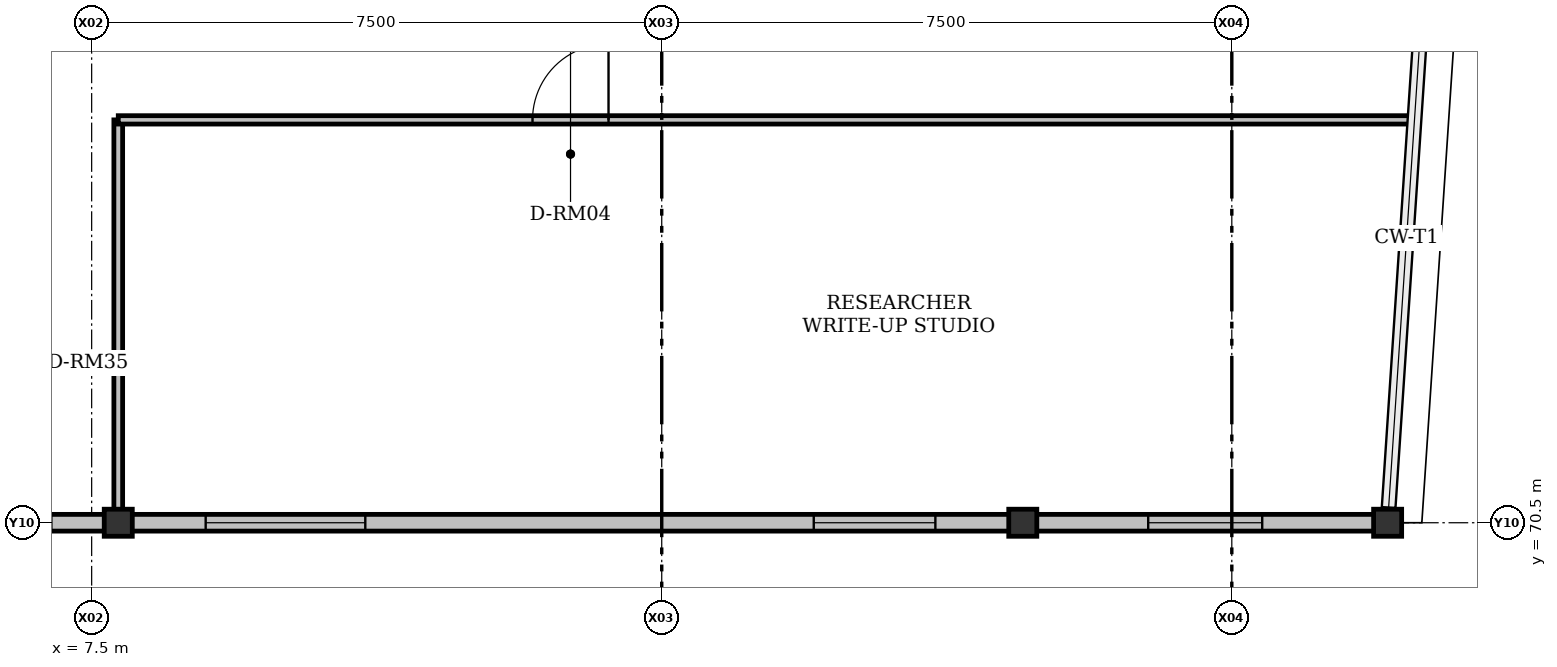
"""IFC4 building model, lengths in metres.
Left out: names, types, materials, properties, quantities, classifications, styles, units other than length and angle.
Written with IfcOpenShell. Run it as: python <this file> out.ifc"""

import sys

from ifc_helpers import new_model, si_unit, direction, frame, frame_2d, origin, origin_2d, place, context, subcontext, project, spatial, rectangle, i_section, extrude, element, fill, save


model = new_model("IFC4")
c1 = context("Model", 3, precision=1e-05, world=origin(), true_north=direction((0.0, 1.0)))
c2 = subcontext(c1, "Body", "Model", "MODEL_VIEW")
j1 = project(units=[si_unit("LENGTHUNIT", "METRE"), si_unit("PLANEANGLEUNIT", "RADIAN")], contexts=[c1])
p1 = place(None, origin())
s1 = spatial("IfcSite", under=j1, at=p1, CompositionType="ELEMENT")
p2 = place(p1, origin())
s2 = spatial("IfcBuilding", under=s1, at=p2, CompositionType="ELEMENT")
p3 = place(p2, frame((0.0, 0.0, 56.1)))
s3 = spatial("IfcBuildingStorey", under=s2, at=p3, CompositionType="ELEMENT", Elevation=56.1)
for number, where, z_axis, x_axis in (
    (1, (7.85, 70.5, 0.0), (0.0, 0.0, 1.0), (1.0, 0.0, 0.0)),
    (2, (19.75, 70.5, 0.0), (0.0, 0.0, 1.0), (1.0, 0.0, 0.0)),
    (3, (24.55, 70.5, 0.0), (0.0, 0.0, 1.0), (1.0, 0.0, 0.0)),
):
    element("IfcColumn", number, at=place(p3, frame(where, z_axis=z_axis, x_axis=x_axis)), inside=s3, PredefinedType="COLUMN", context=c2, shape_type="SweptSolid", body=[
        extrude(i_section(OverallWidth=0.369, OverallDepth=0.356, WebThickness=0.011, FlangeThickness=0.018, FilletRadius=0.015, at=origin_2d()), origin(), (0.0, 0.0, 1.0), 4.2),
    ])
p4 = place(p3, frame((7.85, 70.5, 0.0), z_axis=(0.0, 0.0, 1.0), x_axis=(-1.0, 0.0, 0.0)))
e4 = element("IfcWall", 4, at=p4, inside=s3, PredefinedType="SOLIDWALL", context=c2, shape_type="SweptSolid", body=[
    extrude(rectangle(XDim=7.3, YDim=0.22, at=frame_2d((3.65, 0.0))), origin(), (0.0, 0.0, 1.0), 3.562),
])
p5 = place(p4, frame((0.88, 0.0, 0.92)))
e5 = element("IfcOpeningElement", 5, at=p5, cuts=e4, PredefinedType="OPENING", context=c2, shape_type="SweptSolid", body=[
    extrude(rectangle(XDim=1.05, YDim=1.3, at=frame_2d((0.525, 0.65))), frame((0.0, 0.11, 0.0), z_axis=(0.0, -1.0, 0.0), x_axis=(1.0, 0.0, 0.0)), (0.0, 0.0, 1.0), 0.22),
])
p6 = place(p4, frame((3.945, 0.0, 0.92)))
e6 = element("IfcOpeningElement", 6, at=p6, cuts=e4, PredefinedType="OPENING", context=c2, shape_type="SweptSolid", body=[
    extrude(rectangle(XDim=1.2, YDim=1.4, at=frame_2d((0.6, 0.7))), frame((0.0, 0.11, 0.0), z_axis=(0.0, -1.0, 0.0), x_axis=(1.0, 0.0, 0.0)), (0.0, 0.0, 1.0), 0.22),
])
p7 = place(p3, frame((19.75, 70.5, 0.0), z_axis=(0.0, 0.0, 1.0), x_axis=(-1.0, 0.0, 0.0)))
e7 = element("IfcWall", 7, at=p7, inside=s3, PredefinedType="SOLIDWALL", context=c2, shape_type="SweptSolid", body=[
    extrude(rectangle(XDim=11.9, YDim=0.22, at=frame_2d((5.95, 0.0))), origin(), (0.0, 0.0, 1.0), 3.562),
])
p8 = place(p7, frame((1.15, 0.0, 0.92)))
e8 = element("IfcOpeningElement", 8, at=p8, cuts=e7, PredefinedType="OPENING", context=c2, shape_type="SweptSolid", body=[
    extrude(rectangle(XDim=1.6, YDim=1.35, at=frame_2d((0.8, 0.675))), frame((0.0, 0.11, 0.0), z_axis=(0.0, -1.0, 0.0), x_axis=(1.0, 0.0, 0.0)), (0.0, 0.0, 1.0), 0.22),
])
p9 = place(p7, frame((8.65, 0.0, 0.92)))
e9 = element("IfcOpeningElement", 9, at=p9, cuts=e7, PredefinedType="OPENING", context=c2, shape_type="SweptSolid", body=[
    extrude(rectangle(XDim=2.1, YDim=1.4, at=frame_2d((1.05, 0.7))), frame((0.0, 0.11, 0.0), z_axis=(0.0, -1.0, 0.0), x_axis=(1.0, 0.0, 0.0)), (0.0, 0.0, 1.0), 0.22),
])
p10 = place(p3, frame((24.55, 70.5, 0.0), z_axis=(0.0, 0.0, 1.0), x_axis=(-1.0, 0.0, 0.0)))
e10 = element("IfcWall", 10, at=p10, inside=s3, PredefinedType="SOLIDWALL", context=c2, shape_type="SweptSolid", body=[
    extrude(rectangle(XDim=4.8, YDim=0.22, at=frame_2d((2.4, 0.0))), origin(), (0.0, 0.0, 1.0), 2.775),
])
p11 = place(p10, frame((1.65, 0.0, 0.92)))
e11 = element("IfcOpeningElement", 11, at=p11, cuts=e10, PredefinedType="OPENING", context=c2, shape_type="SweptSolid", body=[
    extrude(rectangle(XDim=1.5, YDim=1.4, at=frame_2d((0.75, 0.7))), frame((0.0, 0.11, 0.0), z_axis=(0.0, -1.0, 0.0), x_axis=(1.0, 0.0, 0.0)), (0.0, 0.0, 1.0), 0.22),
])
p12 = place(p3, frame((7.85, 70.673, 0.0), z_axis=(0.0, 0.0, 1.0), x_axis=(0.0, 1.0, 0.0)))
e12 = element("IfcWall", 12, at=p12, inside=s3, PredefinedType="PARTITIONING", context=c2, shape_type="SweptSolid", body=[
    extrude(rectangle(XDim=5.127, YDim=0.115, at=frame_2d((2.563, 0.0))), origin(), (0.0, 0.0, 1.0), 3.512),
])
p13 = place(p3, frame((7.85, 75.8, 0.0), z_axis=(0.0, 0.0, 1.0), x_axis=(1.0, 0.0, 0.0)))
e13 = element("IfcWall", 13, at=p13, inside=s3, PredefinedType="PARTITIONING", context=c2, shape_type="SweptSolid", body=[
    extrude(rectangle(XDim=17.065, YDim=0.11, at=frame_2d((8.532, 0.0))), origin(), (0.0, 0.0, 1.0), 3.512),
])
p14 = place(p13, frame((5.45, 0.0, 0.0)))
e14 = element("IfcOpeningElement", 14, at=p14, cuts=e13, PredefinedType="OPENING", context=c2, shape_type="SweptSolid", body=[
    extrude(rectangle(XDim=1.0, YDim=2.1, at=frame_2d((0.5, 1.05))), frame((0.0, 0.055, 0.0), z_axis=(0.0, -1.0, 0.0), x_axis=(1.0, 0.0, 0.0)), (0.0, 0.0, 1.0), 0.11),
])
p15 = place(p8, origin())
e15 = element("IfcWindow", 15, at=p15, inside=s3, PartitioningType="DOUBLE_PANEL_VERTICAL", PredefinedType="WINDOW", context=c2, shape_type="SweptSolid", body=[
    extrude(rectangle(XDim=1.6, YDim=1.35, at=frame_2d((0.8, 0.675))), frame((0.0, 0.03, 0.0), z_axis=(0.0, -1.0, 0.0), x_axis=(1.0, 0.0, 0.0)), (0.0, 0.0, 1.0), 0.06),
])
fill(e8, e15)
p16 = place(p9, origin())
e16 = element("IfcWindow", 16, at=p16, inside=s3, PartitioningType="DOUBLE_PANEL_VERTICAL", PredefinedType="WINDOW", context=c2, shape_type="SweptSolid", body=[
    extrude(rectangle(XDim=2.1, YDim=1.4, at=frame_2d((1.05, 0.7))), frame((0.0, 0.03, 0.0), z_axis=(0.0, -1.0, 0.0), x_axis=(1.0, 0.0, 0.0)), (0.0, 0.0, 1.0), 0.06),
])
fill(e9, e16)
p17 = place(p11, origin())
e17 = element("IfcWindow", 17, at=p17, inside=s3, PartitioningType="SINGLE_PANEL", PredefinedType="WINDOW", context=c2, shape_type="SweptSolid", body=[
    extrude(rectangle(XDim=1.5, YDim=1.4, at=frame_2d((0.75, 0.7))), frame((0.0, 0.03, 0.0), z_axis=(0.0, -1.0, 0.0), x_axis=(1.0, 0.0, 0.0)), (0.0, 0.0, 1.0), 0.06),
])
fill(e11, e17)
p18 = place(p14, origin())
e18 = element("IfcDoor", 18, at=p18, inside=s3, OperationType="SINGLE_SWING_RIGHT", PredefinedType="DOOR", context=c2, shape_type="SweptSolid", body=[
    extrude(rectangle(XDim=1.0, YDim=2.1, at=frame_2d((0.5, 1.05))), frame((0.0, 0.025, 0.0), z_axis=(0.0, -1.0, 0.0), x_axis=(1.0, 0.0, 0.0)), (0.0, 0.0, 1.0), 0.05),
])
fill(e14, e18)
save(model, sys.argv[1])
